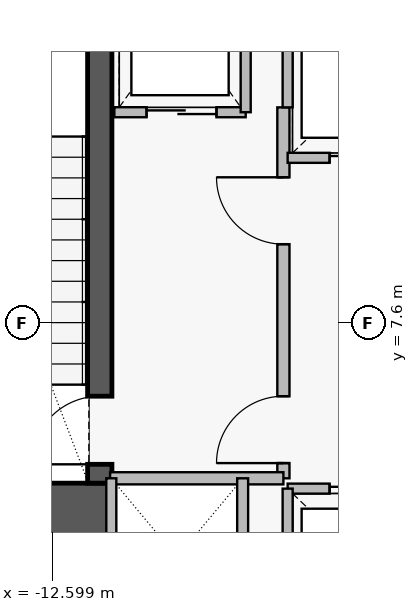
"""IFC4 building model, lengths in metres.
Left out: names, types, materials, properties, quantities, classifications, styles, units other than length and angle.
Written with IfcOpenShell. Run it as: python <this file> out.ifc"""

import sys

from ifc_helpers import new_model, si_unit, direction, frame, frame_2d, origin, place, context, subcontext, project, spatial, rectangle, extrude, element, fill, save


model = new_model("IFC4")
c1 = context("Model", 3, precision=1e-05, world=origin(), true_north=direction((0.0, 1.0)))
c2 = subcontext(c1, "Body", "Model", "MODEL_VIEW")
j1 = project(units=[si_unit("LENGTHUNIT", "METRE"), si_unit("PLANEANGLEUNIT", "RADIAN")], contexts=[c1])
p1 = place(None, origin())
s1 = spatial("IfcSite", under=j1, at=p1, CompositionType="ELEMENT")
p2 = place(p1, origin())
s2 = spatial("IfcBuilding", under=s1, at=p2, CompositionType="ELEMENT")
p3 = place(p2, frame((0.0, 0.0, 22.8)))
s3 = spatial("IfcBuildingStorey", under=s2, at=p3, CompositionType="ELEMENT", Elevation=22.8)
p4 = place(p3, frame((-16.31, 4.52, 0.0), z_axis=(0.0, 0.0, 1.0), x_axis=(1.0, 0.0, 0.0)))
e1 = element("IfcWall", 1, at=p4, inside=s3, PredefinedType="SHEAR", context=c2, shape_type="SweptSolid", body=[
    extrude(rectangle(XDim=4.71, YDim=0.9, at=frame_2d((2.355, 0.0))), origin(), (0.0, 0.0, 1.0), 4.61),
])
p5 = place(p3, frame((-11.82, 4.97, 0.0), z_axis=(0.0, 0.0, 1.0), x_axis=(0.0, 1.0, 0.0)))
e2 = element("IfcWall", 2, at=p5, inside=s3, PredefinedType="SHEAR", context=c2, shape_type="SweptSolid", body=[
    extrude(rectangle(XDim=8.96, YDim=0.4, at=frame_2d((4.48, 0.0))), origin(), (0.0, 0.0, 1.0), 4.61),
])
p6 = place(p5, frame((0.31, 0.0, 0.0)))
e3 = element("IfcOpeningElement", 3, at=p6, cuts=e2, PredefinedType="OPENING", context=c2, shape_type="SweptSolid", body=[
    extrude(rectangle(XDim=1.12, YDim=2.22, at=frame_2d((0.56, 1.11))), frame((0.0, 0.21, 0.0), z_axis=(0.0, -1.0, 0.0), x_axis=(1.0, 0.0, 0.0)), (0.0, 0.0, 1.0), 0.42),
])
p7 = place(p3, frame((-8.8, 5.05, 0.0), z_axis=(0.0, 0.0, 1.0), x_axis=(0.0, 1.0, 0.0)))
e4 = element("IfcWall", 4, at=p7, inside=s3, PredefinedType="PARTITIONING", context=c2, shape_type="SweptSolid", body=[
    extrude(rectangle(XDim=6.1, YDim=0.2, at=frame_2d((3.05, 0.0))), origin(), (0.0, 0.0, 1.0), 4.58),
])
p8 = place(p7, frame((0.25, 0.0, 0.0)))
e5 = element("IfcOpeningElement", 5, at=p8, cuts=e4, PredefinedType="OPENING", context=c2, shape_type="SweptSolid", body=[
    extrude(rectangle(XDim=1.1, YDim=2.2, at=frame_2d((0.55, 1.1))), frame((0.0, 0.11, 0.0), z_axis=(0.0, -1.0, 0.0), x_axis=(1.0, 0.0, 0.0)), (0.0, 0.0, 1.0), 0.22),
])
p9 = place(p7, frame((3.85, 0.0, 0.0)))
e6 = element("IfcOpeningElement", 6, at=p9, cuts=e4, PredefinedType="OPENING", context=c2, shape_type="SweptSolid", body=[
    extrude(rectangle(XDim=1.1, YDim=2.2, at=frame_2d((0.55, 1.1))), frame((0.0, 0.11, 0.0), z_axis=(0.0, -1.0, 0.0), x_axis=(1.0, 0.0, 0.0)), (0.0, 0.0, 1.0), 0.22),
])
p10 = place(p3, frame((-11.58, 11.07, 0.0), z_axis=(0.0, 0.0, 1.0), x_axis=(1.0, 0.0, 0.0)))
e7 = element("IfcWall", 7, at=p10, inside=s3, PredefinedType="PARTITIONING", context=c2, shape_type="SweptSolid", body=[
    extrude(rectangle(XDim=2.16, YDim=0.165, at=frame_2d((1.08, 0.0))), origin(), (0.0, 0.0, 1.0), 4.58),
])
p11 = place(p10, frame((0.53, 0.0, 0.0)))
e8 = element("IfcOpeningElement", 8, at=p11, cuts=e7, PredefinedType="OPENING", context=c2, shape_type="SweptSolid", body=[
    extrude(rectangle(XDim=1.15, YDim=2.25, at=frame_2d((0.575, 1.125))), frame((0.0, 0.093, 0.0), z_axis=(0.0, -1.0, 0.0), x_axis=(1.0, 0.0, 0.0)), (0.0, 0.0, 1.0), 0.185),
])
p12 = place(p3, frame((-8.73, 4.88, 0.0), z_axis=(0.0, 0.0, 1.0), x_axis=(1.0, 0.0, 0.0)))
e9 = element("IfcWall", 9, at=p12, inside=s3, PredefinedType="PARTITIONING", context=c2, shape_type="SweptSolid", body=[
    extrude(rectangle(XDim=2.48, YDim=0.165, at=frame_2d((1.24, 0.0))), origin(), (0.0, 0.0, 1.0), 4.58),
])
p13 = place(p12, frame((0.69, 0.0, 0.0)))
e10 = element("IfcOpeningElement", 10, at=p13, cuts=e9, PredefinedType="OPENING", context=c2, shape_type="SweptSolid", body=[
    extrude(rectangle(XDim=1.1, YDim=2.25, at=frame_2d((0.55, 1.125))), frame((0.0, 0.093, 0.0), z_axis=(0.0, -1.0, 0.0), x_axis=(1.0, 0.0, 0.0)), (0.0, 0.0, 1.0), 0.185),
])
p14 = place(p3, frame((-8.73, 10.32, 0.0), z_axis=(0.0, 0.0, 1.0), x_axis=(1.0, 0.0, 0.0)))
e11 = element("IfcWall", 11, at=p14, inside=s3, PredefinedType="PARTITIONING", context=c2, shape_type="SweptSolid", body=[
    extrude(rectangle(XDim=2.48, YDim=0.165, at=frame_2d((1.24, 0.0))), origin(), (0.0, 0.0, 1.0), 4.58),
])
p15 = place(p14, frame((0.69, 0.0, 0.0)))
e12 = element("IfcOpeningElement", 12, at=p15, cuts=e11, PredefinedType="OPENING", context=c2, shape_type="SweptSolid", body=[
    extrude(rectangle(XDim=1.1, YDim=2.25, at=frame_2d((0.55, 1.125))), frame((0.0, 0.093, 0.0), z_axis=(0.0, -1.0, 0.0), x_axis=(1.0, 0.0, 0.0)), (0.0, 0.0, 1.0), 0.185),
])
p16 = place(p3, frame((-11.65, 5.05, 0.0), z_axis=(0.0, 0.0, 1.0), x_axis=(1.0, 0.0, 0.0)))
e13 = element("IfcWall", 13, at=p16, inside=s3, PredefinedType="PARTITIONING", context=c2, shape_type="SweptSolid", body=[
    extrude(rectangle(XDim=2.85, YDim=0.2, at=frame_2d((1.425, 0.0))), origin(), (0.0, 0.0, 1.0), 4.58),
])
p17 = place(p3, frame((-9.42, 11.07, 0.0), z_axis=(0.0, 0.0, 1.0), x_axis=(0.0, 1.0, 0.0)))
e14 = element("IfcWall", 14, at=p17, inside=s3, PredefinedType="PARTITIONING", context=c2, shape_type="SweptSolid", body=[
    extrude(rectangle(XDim=2.96, YDim=0.165, at=frame_2d((1.48, 0.0))), origin(), (0.0, 0.0, 1.0), 4.58),
])
p18 = place(p3, frame((-8.73, 2.52, 0.0), z_axis=(0.0, 0.0, 1.0), x_axis=(0.0, 1.0, 0.0)))
e15 = element("IfcWall", 15, at=p18, inside=s3, PredefinedType="PARTITIONING", context=c2, shape_type="SweptSolid", body=[
    extrude(rectangle(XDim=2.36, YDim=0.165, at=frame_2d((1.18, 0.0))), origin(), (0.0, 0.0, 1.0), 4.58),
])
p19 = place(p3, frame((-8.73, 11.15, 0.0), z_axis=(0.0, 0.0, 1.0), x_axis=(0.0, 1.0, 0.0)))
e16 = element("IfcWall", 16, at=p19, inside=s3, PredefinedType="PARTITIONING", context=c2, shape_type="SweptSolid", body=[
    extrude(rectangle(XDim=1.53, YDim=0.165, at=frame_2d((0.765, 0.0))), origin(), (0.0, 0.0, 1.0), 4.58),
])
p20 = place(p3, frame((-9.47, 2.45, 0.0), z_axis=(0.0, 0.0, 1.0), x_axis=(0.0, 1.0, 0.0)))
e17 = element("IfcWall", 17, at=p20, inside=s3, PredefinedType="PARTITIONING", context=c2, shape_type="SweptSolid", body=[
    extrude(rectangle(XDim=2.6, YDim=0.18, at=frame_2d((1.3, 0.0))), origin(), (0.0, 0.0, 1.0), 4.58),
])
p21 = place(p3, frame((-11.63, 2.47, 0.0), z_axis=(0.0, 0.0, 1.0), x_axis=(0.0, 1.0, 0.0)))
e18 = element("IfcWall", 18, at=p21, inside=s3, PredefinedType="PARTITIONING", context=c2, shape_type="SweptSolid", body=[
    extrude(rectangle(XDim=2.58, YDim=0.165, at=frame_2d((1.29, 0.0))), origin(), (0.0, 0.0, 1.0), 4.58),
])
p22 = place(p6, origin())
e19 = element("IfcDoor", 19, at=p22, inside=s3, OperationType="SINGLE_SWING_LEFT", PredefinedType="DOOR", context=c2, shape_type="SweptSolid", body=[
    extrude(rectangle(XDim=1.12, YDim=2.22, at=frame_2d((0.56, 1.11))), frame((0.0, 0.025, 0.0), z_axis=(0.0, -1.0, 0.0), x_axis=(1.0, 0.0, 0.0)), (0.0, 0.0, 1.0), 0.05),
])
fill(e3, e19)
p23 = place(p8, origin())
e20 = element("IfcDoor", 20, at=p23, inside=s3, OperationType="SINGLE_SWING_LEFT", PredefinedType="DOOR", context=c2, shape_type="SweptSolid", body=[
    extrude(rectangle(XDim=1.1, YDim=2.2, at=frame_2d((0.55, 1.1))), frame((0.0, 0.025, 0.0), z_axis=(0.0, -1.0, 0.0), x_axis=(1.0, 0.0, 0.0)), (0.0, 0.0, 1.0), 0.05),
])
fill(e5, e20)
p24 = place(p9, origin())
e21 = element("IfcDoor", 21, at=p24, inside=s3, OperationType="SINGLE_SWING_RIGHT", PredefinedType="DOOR", context=c2, shape_type="SweptSolid", body=[
    extrude(rectangle(XDim=1.1, YDim=2.2, at=frame_2d((0.55, 1.1))), frame((0.0, 0.025, 0.0), z_axis=(0.0, -1.0, 0.0), x_axis=(1.0, 0.0, 0.0)), (0.0, 0.0, 1.0), 0.05),
])
fill(e6, e21)
p25 = place(p11, origin())
e22 = element("IfcDoor", 22, at=p25, inside=s3, OperationType="SLIDING_TO_LEFT", PredefinedType="DOOR", context=c2, shape_type="SweptSolid", body=[
    extrude(rectangle(XDim=1.15, YDim=2.25, at=frame_2d((0.575, 1.125))), frame((0.0, 0.025, 0.0), z_axis=(0.0, -1.0, 0.0), x_axis=(1.0, 0.0, 0.0)), (0.0, 0.0, 1.0), 0.05),
])
fill(e8, e22)
p26 = place(p13, origin())
e23 = element("IfcDoor", 23, at=p26, inside=s3, OperationType="SLIDING_TO_LEFT", PredefinedType="DOOR", context=c2, shape_type="SweptSolid", body=[
    extrude(rectangle(XDim=1.1, YDim=2.25, at=frame_2d((0.55, 1.125))), frame((0.0, 0.025, 0.0), z_axis=(0.0, -1.0, 0.0), x_axis=(1.0, 0.0, 0.0)), (0.0, 0.0, 1.0), 0.05),
])
fill(e10, e23)
p27 = place(p15, origin())
e24 = element("IfcDoor", 24, at=p27, inside=s3, OperationType="SLIDING_TO_LEFT", PredefinedType="DOOR", context=c2, shape_type="SweptSolid", body=[
    extrude(rectangle(XDim=1.1, YDim=2.25, at=frame_2d((0.55, 1.125))), frame((0.0, 0.025, 0.0), z_axis=(0.0, -1.0, 0.0), x_axis=(1.0, 0.0, 0.0)), (0.0, 0.0, 1.0), 0.05),
])
fill(e12, e24)
save(model, sys.argv[1])
